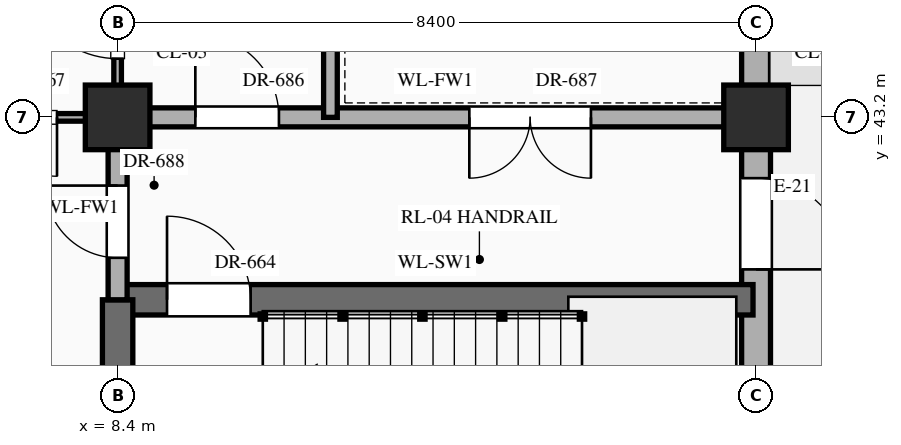
"""IFC4 building model, lengths in metres.
Left out: names, types, materials, properties, quantities, classifications, styles, units other than length and angle.
Written with IfcOpenShell. Run it as: python <this file> out.ifc"""

import sys

from ifc_helpers import new_model, si_unit, direction, frame, frame_2d, origin, origin_2d, place, context, subcontext, project, spatial, rectangle, extrude, element, fill, save


model = new_model("IFC4")
c1 = context("Model", 3, precision=1e-05, world=origin(), true_north=direction((0.0, 1.0)))
c2 = subcontext(c1, "Body", "Model", "MODEL_VIEW")
j1 = project(units=[si_unit("LENGTHUNIT", "METRE"), si_unit("PLANEANGLEUNIT", "RADIAN")], contexts=[c1])
p1 = place(None, origin())
s1 = spatial("IfcSite", under=j1, at=p1, CompositionType="ELEMENT")
p2 = place(p1, origin())
s2 = spatial("IfcBuilding", under=s1, at=p2, CompositionType="ELEMENT")
p3 = place(p2, origin())
s3 = spatial("IfcBuildingStorey", under=s2, at=p3, CompositionType="ELEMENT", Elevation=0.0)
for number, where, z_axis, x_axis in (
    (1, (8.4, 43.2, 0.0), (0.0, 0.0, 1.0), (1.0, 0.0, 0.0)),
    (2, (16.8, 43.2, 0.0), (0.0, 0.0, 1.0), (1.0, 0.0, 0.0)),
):
    element("IfcColumn", number, at=place(p3, frame(where, z_axis=z_axis, x_axis=x_axis)), inside=s3, PredefinedType="COLUMN", context=c2, shape_type="SweptSolid", body=[
        extrude(rectangle(XDim=0.85, YDim=0.85, at=origin_2d()), origin(), (0.0, 0.0, 1.0), 5.4),
    ])
p4 = place(p3, frame((16.8, 36.42, 0.0), z_axis=(0.0, 0.0, 1.0), x_axis=(0.0, 1.0, 0.0)))
e3 = element("IfcWall", 3, at=p4, inside=s3, PredefinedType="STANDARD", context=c2, shape_type="SweptSolid", body=[
    extrude(rectangle(XDim=6.36, YDim=0.38, at=frame_2d((3.18, 0.0))), origin(), (0.0, 0.0, 1.0), 4.47),
])
p5 = place(p4, frame((4.78, 0.0, 0.0)))
e4 = element("IfcOpeningElement", 4, at=p5, cuts=e3, PredefinedType="OPENING", context=c2, shape_type="SweptSolid", body=[
    extrude(rectangle(XDim=1.2, YDim=2.2, at=frame_2d((0.6, 1.1))), frame((0.0, 0.202, 0.0), z_axis=(0.0, -1.0, 0.0), x_axis=(1.0, 0.0, 0.0)), (0.0, 0.0, 1.0), 0.404),
])
p6 = place(p3, frame((16.8, 43.62, 0.0), z_axis=(0.0, 0.0, 1.0), x_axis=(0.0, 1.0, 0.0)))
e5 = element("IfcWall", 5, at=p6, inside=s3, PredefinedType="STANDARD", context=c2, shape_type="SweptSolid", body=[
    extrude(rectangle(XDim=6.36, YDim=0.38, at=frame_2d((3.18, 0.0))), origin(), (0.0, 0.0, 1.0), 4.47),
])
p7 = place(p6, frame((1.98, 0.0, 0.0)))
e6 = element("IfcOpeningElement", 6, at=p7, cuts=e5, PredefinedType="OPENING", context=c2, shape_type="SweptSolid", body=[
    extrude(rectangle(XDim=2.4, YDim=2.4, at=frame_2d((1.2, 1.2))), frame((0.0, 0.202, 0.0), z_axis=(0.0, -1.0, 0.0), x_axis=(1.0, 0.0, 0.0)), (0.0, 0.0, 1.0), 0.404),
])
p8 = place(p3, frame((8.4, 40.8, 0.0), z_axis=(0.0, 0.0, 1.0), x_axis=(1.0, 0.0, 0.0)))
e7 = element("IfcWall", 7, at=p8, inside=s3, PredefinedType="SHEAR", context=c2, shape_type="SweptSolid", body=[
    extrude(rectangle(XDim=8.36, YDim=0.4, at=frame_2d((4.18, 0.0))), origin(), (0.0, 0.0, 1.0), 5.12),
])
p9 = place(p8, frame((0.65, 0.0, 0.0)))
e8 = element("IfcOpeningElement", 8, at=p9, cuts=e7, PredefinedType="OPENING", context=c2, shape_type="SweptSolid", body=[
    extrude(rectangle(XDim=1.1, YDim=2.2, at=frame_2d((0.55, 1.1))), frame((0.0, 0.212, 0.0), z_axis=(0.0, -1.0, 0.0), x_axis=(1.0, 0.0, 0.0)), (0.0, 0.0, 1.0), 0.424),
])
p10 = place(p3, frame((0.04, 43.2, 0.0), z_axis=(0.0, 0.0, 1.0), x_axis=(1.0, 0.0, 0.0)))
e9 = element("IfcWall", 9, at=p10, inside=s3, PredefinedType="STANDARD", context=c2, shape_type="SweptSolid", body=[
    extrude(rectangle(XDim=8.36, YDim=0.1, at=frame_2d((4.18, 0.0))), origin(), (0.0, 0.0, 1.0), 4.27),
])
p11 = place(p10, frame((6.012, 0.0, 0.0)))
e10 = element("IfcOpeningElement", 10, at=p11, cuts=e9, PredefinedType="OPENING", context=c2, shape_type="SweptSolid", body=[
    extrude(rectangle(XDim=1.55, YDim=2.35, at=frame_2d((0.775, 1.175))), frame((0.0, 0.062, 0.0), z_axis=(0.0, -1.0, 0.0), x_axis=(1.0, 0.0, 0.0)), (0.0, 0.0, 1.0), 0.124),
])
p12 = place(p3, frame((8.4, 43.2, 0.0), z_axis=(0.0, 0.0, 1.0), x_axis=(1.0, 0.0, 0.0)))
e11 = element("IfcWall", 11, at=p12, inside=s3, PredefinedType="STANDARD", context=c2, shape_type="SweptSolid", body=[
    extrude(rectangle(XDim=8.36, YDim=0.25, at=frame_2d((4.18, 0.0))), origin(), (0.0, 0.0, 1.0), 4.27),
])
p13 = place(p12, frame((1.022, 0.0, 0.0)))
e12 = element("IfcOpeningElement", 12, at=p13, cuts=e11, PredefinedType="OPENING", context=c2, shape_type="SweptSolid", body=[
    extrude(rectangle(XDim=1.1, YDim=2.2, at=frame_2d((0.55, 1.1))), frame((0.0, 0.137, 0.0), z_axis=(0.0, -1.0, 0.0), x_axis=(1.0, 0.0, 0.0)), (0.0, 0.0, 1.0), 0.274),
])
p14 = place(p12, frame((4.627, 0.0, 0.0)))
e13 = element("IfcOpeningElement", 13, at=p14, cuts=e11, PredefinedType="OPENING", context=c2, shape_type="SweptSolid", body=[
    extrude(rectangle(XDim=1.6, YDim=2.3, at=frame_2d((0.8, 1.15))), frame((0.0, 0.137, 0.0), z_axis=(0.0, -1.0, 0.0), x_axis=(1.0, 0.0, 0.0)), (0.0, 0.0, 1.0), 0.274),
])
p15 = place(p3, frame((8.4, 36.0, 0.0), z_axis=(0.0, 0.0, 1.0), x_axis=(0.0, 1.0, 0.0)))
e14 = element("IfcWall", 14, at=p15, inside=s3, PredefinedType="SHEAR", context=c2, shape_type="SweptSolid", body=[
    extrude(rectangle(XDim=4.8, YDim=0.4, at=frame_2d((2.4, 0.0))), origin(), (0.0, 0.0, 1.0), 5.12),
])
p16 = place(p3, frame((8.4, 40.8, 0.0), z_axis=(0.0, 0.0, 1.0), x_axis=(0.0, 1.0, 0.0)))
e15 = element("IfcWall", 15, at=p16, inside=s3, PredefinedType="STANDARD", context=c2, shape_type="SweptSolid", body=[
    extrude(rectangle(XDim=2.4, YDim=0.25, at=frame_2d((1.2, 0.0))), origin(), (0.0, 0.0, 1.0), 4.37),
])
p17 = place(p16, frame((0.552, 0.0, 0.0)))
e16 = element("IfcOpeningElement", 16, at=p17, cuts=e15, PredefinedType="OPENING", context=c2, shape_type="SweptSolid", body=[
    extrude(rectangle(XDim=0.95, YDim=2.15, at=frame_2d((0.475, 1.075))), frame((0.0, 0.137, 0.0), z_axis=(0.0, -1.0, 0.0), x_axis=(1.0, 0.0, 0.0)), (0.0, 0.0, 1.0), 0.274),
])
p18 = place(p3, frame((8.4, 43.2, 0.0), z_axis=(0.0, 0.0, 1.0), x_axis=(0.0, 1.0, 0.0)))
e17 = element("IfcWall", 17, at=p18, inside=s3, PredefinedType="STANDARD", context=c2, shape_type="SweptSolid", body=[
    extrude(rectangle(XDim=52.8, YDim=0.1, at=frame_2d((26.4, 0.0))), origin(), (0.0, 0.0, 1.0), 4.37),
])
p19 = place(p18, frame((51.272, 0.0, 0.0)))
e18 = element("IfcOpeningElement", 18, at=p19, cuts=e17, PredefinedType="OPENING", context=c2, shape_type="SweptSolid", body=[
    extrude(rectangle(XDim=1.0, YDim=2.25, at=frame_2d((0.5, 1.125))), frame((0.0, 0.062, 0.0), z_axis=(0.0, -1.0, 0.0), x_axis=(1.0, 0.0, 0.0)), (0.0, 0.0, 1.0), 0.124),
])
p20 = place(p18, frame((46.26, 0.0, 0.0)))
e19 = element("IfcOpeningElement", 19, at=p20, cuts=e17, PredefinedType="OPENING", context=c2, shape_type="SweptSolid", body=[
    extrude(rectangle(XDim=1.08, YDim=2.25, at=frame_2d((0.54, 1.125))), frame((0.0, 0.062, 0.0), z_axis=(0.0, -1.0, 0.0), x_axis=(1.0, 0.0, 0.0)), (0.0, 0.0, 1.0), 0.124),
])
p21 = place(p18, frame((41.268, 0.0, 0.0)))
e20 = element("IfcOpeningElement", 20, at=p21, cuts=e17, PredefinedType="OPENING", context=c2, shape_type="SweptSolid", body=[
    extrude(rectangle(XDim=1.12, YDim=2.25, at=frame_2d((0.56, 1.125))), frame((0.0, 0.062, 0.0), z_axis=(0.0, -1.0, 0.0), x_axis=(1.0, 0.0, 0.0)), (0.0, 0.0, 1.0), 0.124),
])
p22 = place(p18, frame((37.992, 0.0, 0.0)))
e21 = element("IfcOpeningElement", 21, at=p22, cuts=e17, PredefinedType="OPENING", context=c2, shape_type="SweptSolid", body=[
    extrude(rectangle(XDim=1.16, YDim=2.3, at=frame_2d((0.58, 1.15))), frame((0.0, 0.062, 0.0), z_axis=(0.0, -1.0, 0.0), x_axis=(1.0, 0.0, 0.0)), (0.0, 0.0, 1.0), 0.124),
])
p23 = place(p18, frame((17.38, 0.0, 0.0)))
e22 = element("IfcOpeningElement", 22, at=p23, cuts=e17, PredefinedType="OPENING", context=c2, shape_type="SweptSolid", body=[
    extrude(rectangle(XDim=1.24, YDim=2.3, at=frame_2d((0.62, 1.15))), frame((0.0, 0.062, 0.0), z_axis=(0.0, -1.0, 0.0), x_axis=(1.0, 0.0, 0.0)), (0.0, 0.0, 1.0), 0.124),
])
p24 = place(p18, frame((24.56, 0.0, 0.0)))
e23 = element("IfcOpeningElement", 23, at=p24, cuts=e17, PredefinedType="OPENING", context=c2, shape_type="SweptSolid", body=[
    extrude(rectangle(XDim=1.28, YDim=2.35, at=frame_2d((0.64, 1.175))), frame((0.0, 0.062, 0.0), z_axis=(0.0, -1.0, 0.0), x_axis=(1.0, 0.0, 0.0)), (0.0, 0.0, 1.0), 0.124),
])
p25 = place(p18, frame((31.93, 0.0, 0.0)))
e24 = element("IfcOpeningElement", 24, at=p25, cuts=e17, PredefinedType="OPENING", context=c2, shape_type="SweptSolid", body=[
    extrude(rectangle(XDim=0.94, YDim=2.3, at=frame_2d((0.47, 1.15))), frame((0.0, 0.062, 0.0), z_axis=(0.0, -1.0, 0.0), x_axis=(1.0, 0.0, 0.0)), (0.0, 0.0, 1.0), 0.124),
])
p26 = place(p18, frame((0.772, 0.0, 0.0)))
e25 = element("IfcOpeningElement", 25, at=p26, cuts=e17, PredefinedType="OPENING", context=c2, shape_type="SweptSolid", body=[
    extrude(rectangle(XDim=1.2, YDim=2.35, at=frame_2d((0.6, 1.175))), frame((0.0, 0.062, 0.0), z_axis=(0.0, -1.0, 0.0), x_axis=(1.0, 0.0, 0.0)), (0.0, 0.0, 1.0), 0.124),
])
p27 = place(p18, frame((4.008, 0.0, 0.0)))
e26 = element("IfcOpeningElement", 26, at=p27, cuts=e17, PredefinedType="OPENING", context=c2, shape_type="SweptSolid", body=[
    extrude(rectangle(XDim=1.24, YDim=2.3, at=frame_2d((0.62, 1.15))), frame((0.0, 0.062, 0.0), z_axis=(0.0, -1.0, 0.0), x_axis=(1.0, 0.0, 0.0)), (0.0, 0.0, 1.0), 0.124),
])
p28 = place(p18, frame((10.16, 0.0, 0.0)))
e27 = element("IfcOpeningElement", 27, at=p28, cuts=e17, PredefinedType="OPENING", context=c2, shape_type="SweptSolid", body=[
    extrude(rectangle(XDim=1.28, YDim=2.35, at=frame_2d((0.64, 1.175))), frame((0.0, 0.062, 0.0), z_axis=(0.0, -1.0, 0.0), x_axis=(1.0, 0.0, 0.0)), (0.0, 0.0, 1.0), 0.124),
])
p29 = place(p3, frame((11.2, 43.2, 0.0), z_axis=(0.0, 0.0, 1.0), x_axis=(0.0, 1.0, 0.0)))
e28 = element("IfcWall", 28, at=p29, inside=s3, PredefinedType="STANDARD", context=c2, shape_type="SweptSolid", body=[
    extrude(rectangle(XDim=14.4, YDim=0.18, at=frame_2d((7.2, 0.0))), origin(), (0.0, 0.0, 1.0), 5.12),
])
p30 = place(p29, frame((2.65, 0.0, 0.0)))
e29 = element("IfcOpeningElement", 29, at=p30, cuts=e28, PredefinedType="OPENING", context=c2, shape_type="SweptSolid", body=[
    extrude(rectangle(XDim=1.9, YDim=2.5, at=frame_2d((0.95, 1.25))), frame((0.0, 0.102, 0.0), z_axis=(0.0, -1.0, 0.0), x_axis=(1.0, 0.0, 0.0)), (0.0, 0.0, 1.0), 0.204),
])
p31 = place(p29, frame((9.9, 0.0, 0.0)))
e30 = element("IfcOpeningElement", 30, at=p31, cuts=e28, PredefinedType="OPENING", context=c2, shape_type="SweptSolid", body=[
    extrude(rectangle(XDim=1.8, YDim=2.5, at=frame_2d((0.9, 1.25))), frame((0.0, 0.102, 0.0), z_axis=(0.0, -1.0, 0.0), x_axis=(1.0, 0.0, 0.0)), (0.0, 0.0, 1.0), 0.204),
])
p32 = place(p5, frame((1.2, 0.0, 0.0), z_axis=(0.0, 0.0, 1.0), x_axis=(-1.0, 0.0, 0.0)))
e31 = element("IfcDoor", 31, at=p32, inside=s3, OperationType="SINGLE_SWING_RIGHT", PredefinedType="DOOR", context=c2, shape_type="SweptSolid", body=[
    extrude(rectangle(XDim=1.2, YDim=2.2, at=frame_2d((0.6, 1.1))), frame((0.0, 0.025, 0.0), z_axis=(0.0, -1.0, 0.0), x_axis=(1.0, 0.0, 0.0)), (0.0, 0.0, 1.0), 0.05),
])
fill(e4, e31)
p33 = place(p9, origin())
e32 = element("IfcDoor", 32, at=p33, inside=s3, OperationType="SINGLE_SWING_LEFT", PredefinedType="DOOR", context=c2, shape_type="SweptSolid", body=[
    extrude(rectangle(XDim=1.1, YDim=2.2, at=frame_2d((0.55, 1.1))), frame((0.0, 0.025, 0.0), z_axis=(0.0, -1.0, 0.0), x_axis=(1.0, 0.0, 0.0)), (0.0, 0.0, 1.0), 0.05),
])
fill(e8, e32)
p34 = place(p13, origin())
e33 = element("IfcDoor", 33, at=p34, inside=s3, OperationType="SINGLE_SWING_LEFT", PredefinedType="DOOR", context=c2, shape_type="SweptSolid", body=[
    extrude(rectangle(XDim=1.1, YDim=2.2, at=frame_2d((0.55, 1.1))), frame((0.0, 0.025, 0.0), z_axis=(0.0, -1.0, 0.0), x_axis=(1.0, 0.0, 0.0)), (0.0, 0.0, 1.0), 0.05),
])
fill(e12, e33)
p35 = place(p14, frame((1.6, 0.0, 0.0), z_axis=(0.0, 0.0, 1.0), x_axis=(-1.0, 0.0, 0.0)))
e34 = element("IfcDoor", 34, at=p35, inside=s3, OperationType="DOUBLE_DOOR_SINGLE_SWING", PredefinedType="DOOR", context=c2, shape_type="SweptSolid", body=[
    extrude(rectangle(XDim=1.6, YDim=2.3, at=frame_2d((0.8, 1.15))), frame((0.0, 0.025, 0.0), z_axis=(0.0, -1.0, 0.0), x_axis=(1.0, 0.0, 0.0)), (0.0, 0.0, 1.0), 0.05),
])
fill(e13, e34)
p36 = place(p17, origin())
e35 = element("IfcDoor", 35, at=p36, inside=s3, OperationType="SINGLE_SWING_RIGHT", PredefinedType="DOOR", context=c2, shape_type="SweptSolid", body=[
    extrude(rectangle(XDim=0.95, YDim=2.15, at=frame_2d((0.475, 1.075))), frame((0.0, 0.025, 0.0), z_axis=(0.0, -1.0, 0.0), x_axis=(1.0, 0.0, 0.0)), (0.0, 0.0, 1.0), 0.05),
])
fill(e16, e35)
p37 = place(p26, origin())
e36 = element("IfcDoor", 36, at=p37, inside=s3, OperationType="SINGLE_SWING_RIGHT", PredefinedType="DOOR", context=c2, shape_type="SweptSolid", body=[
    extrude(rectangle(XDim=1.2, YDim=2.35, at=frame_2d((0.6, 1.175))), frame((0.0, 0.025, 0.0), z_axis=(0.0, -1.0, 0.0), x_axis=(1.0, 0.0, 0.0)), (0.0, 0.0, 1.0), 0.05),
])
fill(e25, e36)
p38 = place(p11, frame((1.55, 0.0, 0.0), z_axis=(0.0, 0.0, 1.0), x_axis=(-1.0, 0.0, 0.0)))
e37 = element("IfcDoor", 37, at=p38, inside=s3, OperationType="DOUBLE_DOOR_SINGLE_SWING", PredefinedType="DOOR", context=c2, shape_type="SweptSolid", body=[
    extrude(rectangle(XDim=1.55, YDim=2.35, at=frame_2d((0.775, 1.175))), frame((0.0, 0.025, 0.0), z_axis=(0.0, -1.0, 0.0), x_axis=(1.0, 0.0, 0.0)), (0.0, 0.0, 1.0), 0.05),
])
fill(e10, e37)
save(model, sys.argv[1])
